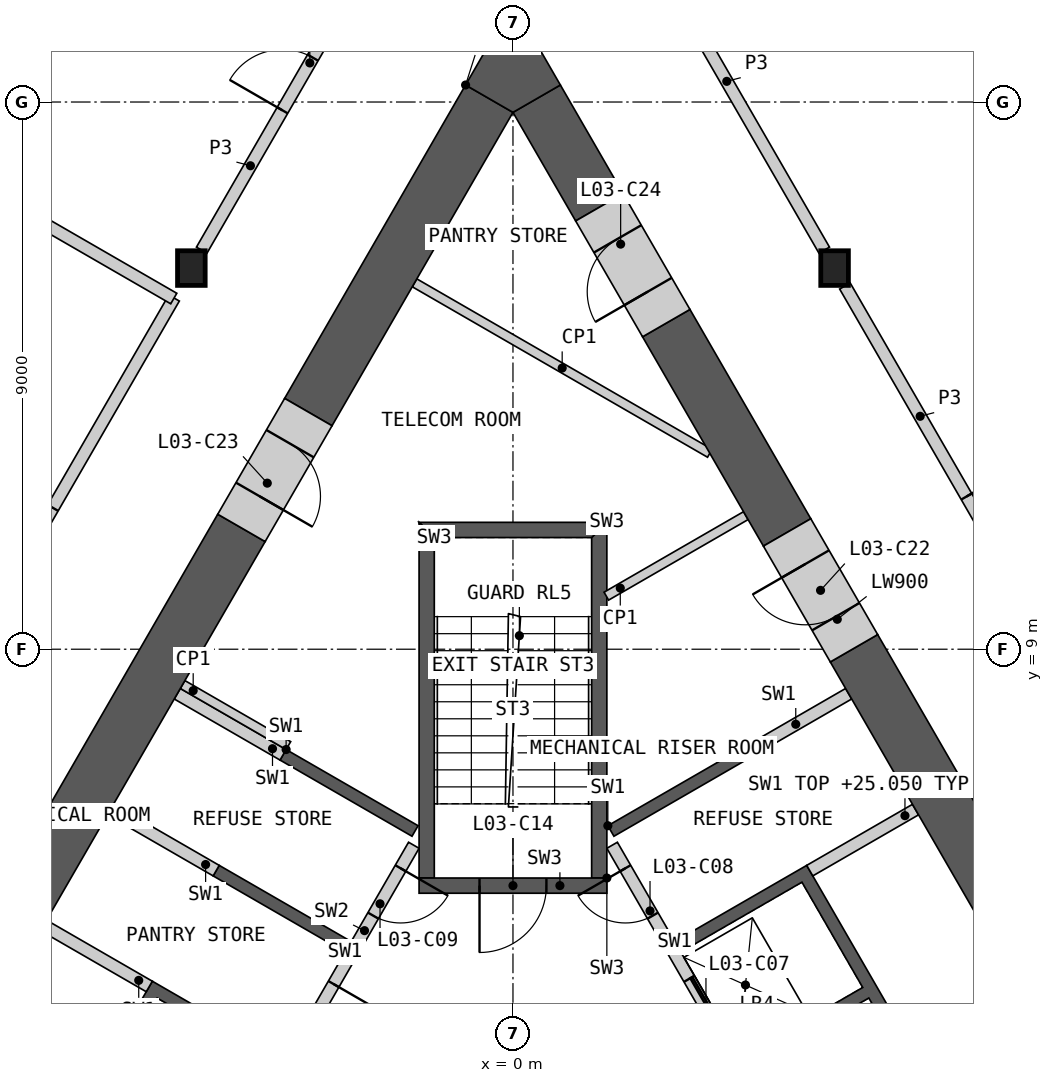
"""IFC4 building model, lengths in metres.
Left out: names, types, materials, properties, quantities, classifications, styles, units other than length and angle.
Written with IfcOpenShell. Run it as: python <this file> out.ifc"""

import sys

from ifc_helpers import new_model, si_unit, direction, frame, frame_2d, origin, origin_2d, place, context, subcontext, project, spatial, polyline, rectangle, i_section, outline, extrude, element, fill, save


model = new_model("IFC4")
c1 = context("Model", 3, precision=1e-05, world=origin(), true_north=direction((0.0, 1.0)))
c2 = subcontext(c1, "Body", "Model", "MODEL_VIEW")
j1 = project(units=[si_unit("LENGTHUNIT", "METRE"), si_unit("PLANEANGLEUNIT", "RADIAN")], contexts=[c1])
p1 = place(None, origin())
s1 = spatial("IfcSite", under=j1, at=p1, CompositionType="ELEMENT")
p2 = place(p1, origin())
s2 = spatial("IfcBuilding", under=s1, at=p2, CompositionType="ELEMENT")
p3 = place(p2, frame((0.0, 0.0, 21.0)))
s3 = spatial("IfcBuildingStorey", under=s2, at=p3, CompositionType="ELEMENT", Elevation=21.0)
for number, where, z_axis, x_axis in (
    (1, (-5.289, 15.269, 0.0), (0.0, 0.0, 1.0), (1.0, 0.0, 0.0)),
    (2, (5.289, 15.269, 0.0), (0.0, 0.0, 1.0), (1.0, 0.0, 0.0)),
):
    element("IfcColumn", number, at=place(p3, frame(where, z_axis=z_axis, x_axis=x_axis)), inside=s3, PredefinedType="COLUMN", context=c2, shape_type="SweptSolid", body=[
        extrude(i_section(OverallWidth=0.454, OverallDepth=0.57, WebThickness=0.078, FlangeThickness=0.125, at=origin_2d()), origin(), (0.0, 0.0, 1.0), 4.5),
    ])
p4 = place(p3, origin())
e3 = element("IfcWall", 3, at=p4, inside=s3, PredefinedType="SHEAR", context=c2, shape_type="SweptSolid", body=[
    extrude(outline(polyline([(1.561, 6.097), (3.731, 7.35), (3.831, 7.177), (1.66, 5.924), (1.561, 6.097)])), origin(), (0.0, 0.0, 1.0), 4.05),
])
p5 = place(p3, origin())
e4 = element("IfcWall", 4, at=p5, inside=s3, PredefinedType="SHEAR", context=c2, shape_type="SweptSolid", body=[
    extrude(outline(polyline([(2.66, 4.192), (4.831, 5.445), (8.231, -0.444), (6.061, -1.697), (5.96, -1.524), (7.952, -0.374), (6.952, 1.358), (4.96, 0.208), (4.861, 0.381), (6.852, 1.531), (5.852, 3.263), (3.861, 2.113), (3.76, 2.287), (5.752, 3.437), (4.752, 5.169), (2.76, 4.019), (2.66, 4.192)])), origin(), (0.0, 0.0, 1.0), 4.05),
])
p6 = place(p3, frame((5.817, -1.476, 0.0), z_axis=(0.0, 0.0, 1.0), x_axis=(-0.500002616675, 0.866023893041, 0.0)))
e5 = element("IfcWall", 5, at=p6, inside=s3, PredefinedType="SOLIDWALL", context=c2, shape_type="SweptSolid", body=[
    extrude(rectangle(XDim=8.373, YDim=0.2, at=frame_2d((4.187, 0.0))), origin(), (0.0, 0.0, 1.0), 4.05),
])
p7 = place(p6, frame((0.337, 0.0, 0.0)))
e6 = element("IfcOpeningElement", 6, at=p7, cuts=e5, PredefinedType="OPENING", context=c2, shape_type="SweptSolid", body=[
    extrude(rectangle(XDim=1.1, YDim=2.1, at=frame_2d((0.55, 1.05))), frame((0.0, 0.11, 0.0), z_axis=(0.0, -1.0, 0.0), x_axis=(1.0, 0.0, 0.0)), (0.0, 0.0, 1.0), 0.22),
])
p8 = place(p6, frame((2.537, 0.0, 0.0)))
e7 = element("IfcOpeningElement", 7, at=p8, cuts=e5, PredefinedType="OPENING", context=c2, shape_type="SweptSolid", body=[
    extrude(rectangle(XDim=1.1, YDim=2.1, at=frame_2d((0.55, 1.05))), frame((0.0, 0.11, 0.0), z_axis=(0.0, -1.0, 0.0), x_axis=(1.0, 0.0, 0.0)), (0.0, 0.0, 1.0), 0.22),
])
p9 = place(p6, frame((4.737, 0.0, 0.0)))
e8 = element("IfcOpeningElement", 8, at=p9, cuts=e5, PredefinedType="OPENING", context=c2, shape_type="SweptSolid", body=[
    extrude(rectangle(XDim=1.1, YDim=2.1, at=frame_2d((0.55, 1.05))), frame((0.0, 0.11, 0.0), z_axis=(0.0, -1.0, 0.0), x_axis=(1.0, 0.0, 0.0)), (0.0, 0.0, 1.0), 0.22),
])
p10 = place(p6, frame((7.037, 0.0, 0.0)))
e9 = element("IfcOpeningElement", 9, at=p10, cuts=e5, PredefinedType="OPENING", context=c2, shape_type="SweptSolid", body=[
    extrude(rectangle(XDim=0.9, YDim=2.1, at=frame_2d((0.45, 1.05))), frame((0.0, 0.11, 0.0), z_axis=(0.0, -1.0, 0.0), x_axis=(1.0, 0.0, 0.0)), (0.0, 0.0, 1.0), 0.22),
])
p11 = place(p3, frame((4.881, 5.358, 0.0), z_axis=(0.0, 0.0, 1.0), x_axis=(0.866035824272, 0.499981950752, 0.0)))
e10 = element("IfcWall", 10, at=p11, inside=s3, PredefinedType="SHEAR", context=c2, shape_type="SweptSolid", body=[
    extrude(rectangle(XDim=2.009, YDim=0.2, at=frame_2d((1.004, 0.0))), origin(), (0.0, 0.0, 1.0), 4.05),
])
p12 = place(p3, frame((3.781, 7.263, 0.0), z_axis=(0.0, 0.0, 1.0), x_axis=(0.865983199114, 0.50007309351, 0.0)))
e11 = element("IfcWall", 11, at=p12, inside=s3, PredefinedType="SHEAR", context=c2, shape_type="SweptSolid", body=[
    extrude(rectangle(XDim=2.009, YDim=0.2, at=frame_2d((1.004, 0.0))), origin(), (0.0, 0.0, 1.0), 4.05),
])
p13 = place(p3, origin())
e12 = element("IfcWall", 12, at=p13, inside=s3, PredefinedType="SHEAR", context=c2, shape_type="SweptSolid", body=[
    extrude(outline(polyline([(-4.96, 0.208), (-7.131, 1.461), (-5.931, 3.54), (-3.76, 2.287), (-3.861, 2.113), (-5.852, 3.263), (-6.852, 1.531), (-4.861, 0.381), (-4.96, 0.208)])), origin(), (0.0, 0.0, 1.0), 4.05),
])
p14 = place(p3, origin())
e13 = element("IfcWall", 13, at=p14, inside=s3, PredefinedType="SHEAR", context=c2, shape_type="SweptSolid", body=[
    extrude(outline(polyline([(-2.76, 4.019), (-4.931, 5.272), (-4.831, 5.445), (-2.66, 4.192), (-2.76, 4.019)])), origin(), (0.0, 0.0, 1.0), 4.05),
])
p15 = place(p3, origin())
e14 = element("IfcWall", 14, at=p15, inside=s3, PredefinedType="SHEAR", context=c2, shape_type="SweptSolid", body=[
    extrude(outline(polyline([(-3.731, 7.35), (-1.561, 6.097), (-1.66, 5.924), (-3.831, 7.177), (-3.731, 7.35)])), origin(), (0.0, 0.0, 1.0), 4.05),
])
p16 = place(p3, frame((-1.631, 5.776, 0.0), z_axis=(0.0, 0.0, 1.0), x_axis=(-0.499992876559, -0.866029516466, 0.0)))
e15 = element("IfcWall", 15, at=p16, inside=s3, PredefinedType="SOLIDWALL", context=c2, shape_type="SweptSolid", body=[
    extrude(rectangle(XDim=6.486, YDim=0.2, at=frame_2d((3.243, 0.0))), origin(), (0.0, 0.0, 1.0), 4.05),
])
p17 = place(p16, frame((0.437, 0.0, 0.0)))
e16 = element("IfcOpeningElement", 16, at=p17, cuts=e15, PredefinedType="OPENING", context=c2, shape_type="SweptSolid", body=[
    extrude(rectangle(XDim=0.9, YDim=2.1, at=frame_2d((0.45, 1.05))), frame((0.0, 0.11, 0.0), z_axis=(0.0, -1.0, 0.0), x_axis=(1.0, 0.0, 0.0)), (0.0, 0.0, 1.0), 0.22),
])
p18 = place(p16, frame((2.637, 0.0, 0.0)))
e17 = element("IfcOpeningElement", 17, at=p18, cuts=e15, PredefinedType="OPENING", context=c2, shape_type="SweptSolid", body=[
    extrude(rectangle(XDim=0.9, YDim=2.1, at=frame_2d((0.45, 1.05))), frame((0.0, 0.11, 0.0), z_axis=(0.0, -1.0, 0.0), x_axis=(1.0, 0.0, 0.0)), (0.0, 0.0, 1.0), 0.22),
])
p19 = place(p3, frame((-3.781, 7.263, 0.0), z_axis=(0.0, 0.0, 1.0), x_axis=(-0.865983199114, 0.50007309351, 0.0)))
e18 = element("IfcWall", 18, at=p19, inside=s3, PredefinedType="SHEAR", context=c2, shape_type="SweptSolid", body=[
    extrude(rectangle(XDim=2.009, YDim=0.2, at=frame_2d((1.004, 0.0))), origin(), (0.0, 0.0, 1.0), 4.05),
])
p20 = place(p3, frame((-4.881, 5.358, 0.0), z_axis=(0.0, 0.0, 1.0), x_axis=(-0.866035824272, 0.499981950752, 0.0)))
e19 = element("IfcWall", 19, at=p20, inside=s3, PredefinedType="SHEAR", context=c2, shape_type="SweptSolid", body=[
    extrude(rectangle(XDim=2.009, YDim=0.2, at=frame_2d((1.004, 0.0))), origin(), (0.0, 0.0, 1.0), 4.05),
])
p21 = place(p3, frame((-5.981, 3.453, 0.0), z_axis=(0.0, 0.0, 1.0), x_axis=(-0.866013584312, 0.500020471368, 0.0)))
e20 = element("IfcWall", 20, at=p21, inside=s3, PredefinedType="SHEAR", context=c2, shape_type="SweptSolid", body=[
    extrude(rectangle(XDim=2.009, YDim=0.2, at=frame_2d((1.005, 0.0))), origin(), (0.0, 0.0, 1.0), 4.05),
])
p22 = place(p3, origin())
e21 = element("IfcWall", 21, at=p22, inside=s3, PredefinedType="SHEAR", context=c2, shape_type="SweptSolid", body=[
    extrude(outline(polyline([(1.544, 5.237), (1.544, 11.087), (1.294, 10.837), (1.294, 5.237), (1.544, 5.237)])), origin(), (0.0, 0.0, 1.0), 4.05),
])
p23 = place(p3, origin())
e22 = element("IfcWall", 22, at=p23, inside=s3, PredefinedType="SHEAR", context=c2, shape_type="SweptSolid", body=[
    extrude(outline(polyline([(1.544, 11.087), (-1.544, 11.087), (-1.294, 10.837), (1.294, 10.837), (1.544, 11.087)])), origin(), (0.0, 0.0, 1.0), 4.05),
])
p24 = place(p3, origin())
e23 = element("IfcWall", 23, at=p24, inside=s3, PredefinedType="SHEAR", context=c2, shape_type="SweptSolid", body=[
    extrude(outline(polyline([(-1.294, 10.837), (-1.544, 11.087), (-1.544, 5.237), (-1.294, 5.237), (-1.294, 10.837)])), origin(), (0.0, 0.0, 1.0), 4.05),
])
p25 = place(p3, frame((1.544, 5.112, 0.0), z_axis=(0.0, 0.0, 1.0), x_axis=(-1.0, 0.0, 0.0)))
e24 = element("IfcWall", 24, at=p25, inside=s3, PredefinedType="SHEAR", context=c2, shape_type="SweptSolid", body=[
    extrude(rectangle(XDim=3.088, YDim=0.25, at=frame_2d((1.544, 0.0))), origin(), (0.0, 0.0, 1.0), 4.05),
])
p26 = place(p25, frame((0.994, 0.0, 0.0)))
e25 = element("IfcOpeningElement", 25, at=p26, cuts=e24, PredefinedType="OPENING", context=c2, shape_type="SweptSolid", body=[
    extrude(rectangle(XDim=1.1, YDim=2.1, at=frame_2d((0.55, 1.05))), frame((0.0, 0.135, 0.0), z_axis=(0.0, -1.0, 0.0), x_axis=(1.0, 0.0, 0.0)), (0.0, 0.0, 1.0), 0.27),
])
p27 = place(p3, frame((-3.693, 7.415, 0.0), z_axis=(0.0, 0.0, 1.0), x_axis=(-0.866035824272, 0.499981950752, 0.0)))
e26 = element("IfcWall", 26, at=p27, inside=s3, PredefinedType="PARTITIONING", context=c2, shape_type="SweptSolid", body=[
    extrude(rectangle(XDim=2.009, YDim=0.15, at=frame_2d((1.004, 0.0))), origin(), (0.0, 0.0, 1.0), 4.05),
])
p28 = place(p3, frame((3.829, 11.197, 0.0), z_axis=(0.0, 0.0, 1.0), x_axis=(-0.866016748302, -0.500014991436, 0.0)))
e27 = element("IfcWall", 27, at=p28, inside=s3, PredefinedType="PARTITIONING", context=c2, shape_type="SweptSolid", body=[
    extrude(rectangle(XDim=2.649, YDim=0.15, at=frame_2d((1.324, 0.0))), origin(), (0.0, 0.0, 1.0), 4.05),
])
p29 = place(p3, frame((-1.619, 15.026, 0.0), z_axis=(0.0, 0.0, 1.0), x_axis=(0.866015917575, -0.500016430238, 0.0)))
e28 = element("IfcWall", 28, at=p29, inside=s3, PredefinedType="PARTITIONING", context=c2, shape_type="SweptSolid", body=[
    extrude(rectangle(XDim=5.607, YDim=0.15, at=frame_2d((2.804, 0.0))), origin(), (0.0, 0.0, 1.0), 4.05),
])
p30 = place(p3, frame((9.561, 2.169, 0.0), z_axis=(0.0, 0.0, 1.0), x_axis=(-0.499995114243, 0.866028224559, 0.0)))
e29 = element("IfcWall", 29, at=p30, inside=s3, PredefinedType="SHEAR", context=c2, shape_type="SweptSolid", body=[
    extrude(rectangle(XDim=7.906, YDim=0.9, at=frame_2d((3.953, 0.0))), origin(), (0.0, 0.0, 1.0), 4.05),
])
p31 = place(p3, frame((4.509, 10.921, 0.0), z_axis=(0.0, 0.0, 1.0), x_axis=(-0.49999004381, 0.866031151917, 0.0)))
e30 = element("IfcWall", 30, at=p31, inside=s3, PredefinedType="SHEAR", context=c2, shape_type="SweptSolid", body=[
    extrude(rectangle(XDim=3.975, YDim=0.9, at=frame_2d((1.988, 0.0))), origin(), (0.0, 0.0, 1.0), 4.05),
])
p32 = place(p3, frame((1.421, 16.269, 0.0), z_axis=(0.0, 0.0, 1.0), x_axis=(-0.500009360108, 0.866019999656, 0.0)))
e31 = element("IfcWall", 31, at=p32, inside=s3, PredefinedType="SHEAR", context=c2, shape_type="SweptSolid", body=[
    extrude(rectangle(XDim=2.062, YDim=0.9, at=frame_2d((1.031, 0.0))), origin(), (0.0, 0.0, 1.0), 4.05),
])
p33 = place(p3, frame((-4.466, 10.995, 0.0), z_axis=(0.0, 0.0, 1.0), x_axis=(-0.500012427149, -0.866018228848, 0.0)))
e32 = element("IfcWall", 32, at=p33, inside=s3, PredefinedType="SHEAR", context=c2, shape_type="SweptSolid", body=[
    extrude(rectangle(XDim=7.409, YDim=0.9, at=frame_2d((3.705, 0.0))), origin(), (0.0, 0.0, 1.0), 4.05),
])
p34 = place(p3, frame((-0.39, 18.055, 0.0), z_axis=(0.0, 0.0, 1.0), x_axis=(-0.499981657175, -0.86603599376, 0.0)))
e33 = element("IfcWall", 33, at=p34, inside=s3, PredefinedType="SHEAR", context=c2, shape_type="SweptSolid", body=[
    extrude(rectangle(XDim=5.952, YDim=0.9, at=frame_2d((2.976, 0.0))), origin(), (0.0, 0.0, 1.0), 4.05),
])
p35 = place(p3, origin())
e34 = element("IfcWall", 34, at=p35, inside=s3, PredefinedType="SHEAR", context=c2, shape_type="SweptSolid", body=[
    extrude(outline(polyline([(-0.779, 18.28), (0.0, 19.63), (0.779, 18.28), (0.0, 17.83), (-0.779, 18.28)])), origin(), (0.0, 0.0, 1.0), 4.05),
])
p36 = place(p3, frame((5.608, 9.016, 0.0), z_axis=(0.0, 0.0, 1.0), x_axis=(-0.499994660107, 0.866028486751, 0.0)))
e35 = element("IfcWall", 35, at=p36, inside=s3, PredefinedType="SHEAR", context=c2, shape_type="SweptSolid", body=[
    extrude(rectangle(XDim=2.2, YDim=0.9, at=frame_2d((1.1, 0.0))), origin(), (0.0, 0.0, 1.0), 4.05),
])
p37 = place(p36, frame((0.6, 0.0, 0.0)))
e36 = element("IfcOpeningElement", 36, at=p37, cuts=e35, PredefinedType="OPENING", context=c2, shape_type="SweptSolid", body=[
    extrude(rectangle(XDim=1.0, YDim=2.1, at=frame_2d((0.5, 1.05))), frame((0.0, 0.46, 0.0), z_axis=(0.0, -1.0, 0.0), x_axis=(1.0, 0.0, 0.0)), (0.0, 0.0, 1.0), 0.92),
])
p38 = place(p3, frame((-3.365, 12.9, 0.0), z_axis=(0.0, 0.0, 1.0), x_axis=(-0.500077893725, -0.86598042715, 0.0)))
e37 = element("IfcWall", 37, at=p38, inside=s3, PredefinedType="SHEAR", context=c2, shape_type="SweptSolid", body=[
    extrude(rectangle(XDim=2.2, YDim=0.9, at=frame_2d((1.1, 0.0))), origin(), (0.0, 0.0, 1.0), 4.05),
])
p39 = place(p38, frame((0.6, 0.0, 0.0)))
e38 = element("IfcOpeningElement", 38, at=p39, cuts=e37, PredefinedType="OPENING", context=c2, shape_type="SweptSolid", body=[
    extrude(rectangle(XDim=1.0, YDim=2.1, at=frame_2d((0.5, 1.05))), frame((0.0, 0.46, 0.0), z_axis=(0.0, -1.0, 0.0), x_axis=(1.0, 0.0, 0.0)), (0.0, 0.0, 1.0), 0.92),
])
p40 = place(p3, frame((2.521, 14.364, 0.0), z_axis=(0.0, 0.0, 1.0), x_axis=(-0.50002983664, 0.866008176907, 0.0)))
e39 = element("IfcWall", 39, at=p40, inside=s3, PredefinedType="SHEAR", context=c2, shape_type="SweptSolid", body=[
    extrude(rectangle(XDim=2.2, YDim=0.9, at=frame_2d((1.1, 0.0))), origin(), (0.0, 0.0, 1.0), 4.05),
])
p41 = place(p40, frame((0.6, 0.0, 0.0)))
e40 = element("IfcOpeningElement", 40, at=p41, cuts=e39, PredefinedType="OPENING", context=c2, shape_type="SweptSolid", body=[
    extrude(rectangle(XDim=1.0, YDim=2.1, at=frame_2d((0.5, 1.05))), frame((0.0, 0.46, 0.0), z_axis=(0.0, -1.0, 0.0), x_axis=(1.0, 0.0, 0.0)), (0.0, 0.0, 1.0), 0.92),
])
p42 = place(p3, frame((5.459, 14.974, 0.0), z_axis=(0.0, 0.0, 1.0), x_axis=(0.499985793049, -0.866033606016, 0.0)))
e41 = element("IfcWall", 41, at=p42, inside=s3, PredefinedType="PARTITIONING", context=c2, shape_type="SweptSolid", body=[
    extrude(rectangle(XDim=9.898, YDim=0.2, at=frame_2d((4.949, 0.0))), origin(), (0.0, 0.0, 1.0), 4.05),
])
p43 = place(p42, frame((3.998, 0.0, 0.0)))
e42 = element("IfcOpeningElement", 42, at=p43, cuts=e41, PredefinedType="OPENING", context=c2, shape_type="SweptSolid", body=[
    extrude(rectangle(XDim=1.8, YDim=2.1, at=frame_2d((0.9, 1.05))), frame((0.0, 0.11, 0.0), z_axis=(0.0, -1.0, 0.0), x_axis=(1.0, 0.0, 0.0)), (0.0, 0.0, 1.0), 0.22),
])
p44 = place(p3, frame((-10.408, 6.402, 0.0), z_axis=(0.0, 0.0, 1.0), x_axis=(0.499986904098, 0.866032964575, 0.0)))
e43 = element("IfcWall", 43, at=p44, inside=s3, PredefinedType="PARTITIONING", context=c2, shape_type="SweptSolid", body=[
    extrude(rectangle(XDim=9.67, YDim=0.2, at=frame_2d((4.835, 0.0))), origin(), (0.0, 0.0, 1.0), 4.05),
])
p45 = place(p44, frame((3.884, 0.0, 0.0)))
e44 = element("IfcOpeningElement", 44, at=p45, cuts=e43, PredefinedType="OPENING", context=c2, shape_type="SweptSolid", body=[
    extrude(rectangle(XDim=1.8, YDim=2.1, at=frame_2d((0.9, 1.05))), frame((0.0, 0.11, 0.0), z_axis=(0.0, -1.0, 0.0), x_axis=(1.0, 0.0, 0.0)), (0.0, 0.0, 1.0), 0.22),
])
p46 = place(p3, frame((-5.119, 15.563, 0.0), z_axis=(0.0, 0.0, 1.0), x_axis=(0.500004801114, 0.866022631842, 0.0)))
e45 = element("IfcWall", 45, at=p46, inside=s3, PredefinedType="PARTITIONING", context=c2, shape_type="SweptSolid", body=[
    extrude(rectangle(XDim=6.412, YDim=0.2, at=frame_2d((3.206, 0.0))), origin(), (0.0, 0.0, 1.0), 4.05),
])
p47 = place(p46, frame((2.656, 0.0, 0.0)))
e46 = element("IfcOpeningElement", 46, at=p47, cuts=e45, PredefinedType="OPENING", context=c2, shape_type="SweptSolid", body=[
    extrude(rectangle(XDim=1.0, YDim=2.1, at=frame_2d((0.5, 1.05))), frame((0.0, 0.11, 0.0), z_axis=(0.0, -1.0, 0.0), x_axis=(1.0, 0.0, 0.0)), (0.0, 0.0, 1.0), 0.22),
])
p48 = place(p3, frame((1.913, 21.116, 0.0), z_axis=(0.0, 0.0, 1.0), x_axis=(0.500004801114, -0.866022631842, 0.0)))
e47 = element("IfcWall", 47, at=p48, inside=s3, PredefinedType="PARTITIONING", context=c2, shape_type="SweptSolid", body=[
    extrude(rectangle(XDim=6.412, YDim=0.2, at=frame_2d((3.206, 0.0))), origin(), (0.0, 0.0, 1.0), 4.05),
])
p49 = place(p3, frame((-14.31, 19.809, 0.0), z_axis=(0.0, 0.0, 1.0), x_axis=(0.866017018378, -0.500014523669, 0.0)))
e48 = element("IfcWall", 48, at=p49, inside=s3, PredefinedType="PARTITIONING", context=c2, shape_type="SweptSolid", body=[
    extrude(rectangle(XDim=10.082, YDim=0.2, at=frame_2d((5.041, 0.0))), origin(), (0.0, 0.0, 1.0), 4.05),
])
p50 = place(p9, origin())
e49 = element("IfcDoor", 49, at=p50, inside=s3, OperationType="SLIDING_TO_LEFT", PredefinedType="DOOR", context=c2, shape_type="SweptSolid", body=[
    extrude(rectangle(XDim=1.1, YDim=2.1, at=frame_2d((0.55, 1.05))), frame((0.0, 0.025, 0.0), z_axis=(0.0, -1.0, 0.0), x_axis=(1.0, 0.0, 0.0)), (0.0, 0.0, 1.0), 0.05),
])
fill(e8, e49)
p51 = place(p10, origin())
e50 = element("IfcDoor", 50, at=p51, inside=s3, OperationType="SINGLE_SWING_RIGHT", PredefinedType="DOOR", context=c2, shape_type="SweptSolid", body=[
    extrude(rectangle(XDim=0.9, YDim=2.1, at=frame_2d((0.45, 1.05))), frame((0.0, 0.025, 0.0), z_axis=(0.0, -1.0, 0.0), x_axis=(1.0, 0.0, 0.0)), (0.0, 0.0, 1.0), 0.05),
])
fill(e9, e50)
p52 = place(p17, origin())
e51 = element("IfcDoor", 51, at=p52, inside=s3, OperationType="SINGLE_SWING_LEFT", PredefinedType="DOOR", context=c2, shape_type="SweptSolid", body=[
    extrude(rectangle(XDim=0.9, YDim=2.1, at=frame_2d((0.45, 1.05))), frame((0.0, 0.025, 0.0), z_axis=(0.0, -1.0, 0.0), x_axis=(1.0, 0.0, 0.0)), (0.0, 0.0, 1.0), 0.05),
])
fill(e16, e51)
p53 = place(p18, origin())
e52 = element("IfcDoor", 52, at=p53, inside=s3, OperationType="SINGLE_SWING_LEFT", PredefinedType="DOOR", context=c2, shape_type="SweptSolid", body=[
    extrude(rectangle(XDim=0.9, YDim=2.1, at=frame_2d((0.45, 1.05))), frame((0.0, 0.025, 0.0), z_axis=(0.0, -1.0, 0.0), x_axis=(1.0, 0.0, 0.0)), (0.0, 0.0, 1.0), 0.05),
])
fill(e17, e52)
p54 = place(p26, origin())
e53 = element("IfcDoor", 53, at=p54, inside=s3, OperationType="SINGLE_SWING_RIGHT", PredefinedType="DOOR", context=c2, shape_type="SweptSolid", body=[
    extrude(rectangle(XDim=1.1, YDim=2.1, at=frame_2d((0.55, 1.05))), frame((0.0, 0.025, 0.0), z_axis=(0.0, -1.0, 0.0), x_axis=(1.0, 0.0, 0.0)), (0.0, 0.0, 1.0), 0.05),
])
fill(e25, e53)
p55 = place(p37, origin())
e54 = element("IfcDoor", 54, at=p55, inside=s3, OperationType="SINGLE_SWING_RIGHT", PredefinedType="DOOR", context=c2, shape_type="SweptSolid", body=[
    extrude(rectangle(XDim=1.0, YDim=2.1, at=frame_2d((0.5, 1.05))), frame((0.0, 0.205, 0.0), z_axis=(0.0, -1.0, 0.0), x_axis=(1.0, 0.0, 0.0)), (0.0, 0.0, 1.0), 0.05),
])
fill(e36, e54)
p56 = place(p39, origin())
e55 = element("IfcDoor", 55, at=p56, inside=s3, OperationType="SINGLE_SWING_RIGHT", PredefinedType="DOOR", context=c2, shape_type="SweptSolid", body=[
    extrude(rectangle(XDim=1.0, YDim=2.1, at=frame_2d((0.5, 1.05))), frame((0.0, 0.205, 0.0), z_axis=(0.0, -1.0, 0.0), x_axis=(1.0, 0.0, 0.0)), (0.0, 0.0, 1.0), 0.05),
])
fill(e38, e55)
p57 = place(p41, origin())
e56 = element("IfcDoor", 56, at=p57, inside=s3, OperationType="SINGLE_SWING_LEFT", PredefinedType="DOOR", context=c2, shape_type="SweptSolid", body=[
    extrude(rectangle(XDim=1.0, YDim=2.1, at=frame_2d((0.5, 1.05))), frame((0.0, 0.205, 0.0), z_axis=(0.0, -1.0, 0.0), x_axis=(1.0, 0.0, 0.0)), (0.0, 0.0, 1.0), 0.05),
])
fill(e40, e56)
p58 = place(p47, origin())
e57 = element("IfcDoor", 57, at=p58, inside=s3, OperationType="SINGLE_SWING_LEFT", PredefinedType="DOOR", context=c2, shape_type="SweptSolid", body=[
    extrude(rectangle(XDim=1.0, YDim=2.1, at=frame_2d((0.5, 1.05))), frame((0.0, 0.025, 0.0), z_axis=(0.0, -1.0, 0.0), x_axis=(1.0, 0.0, 0.0)), (0.0, 0.0, 1.0), 0.05),
])
fill(e46, e57)
p59 = place(p45, origin())
e58 = element("IfcDoor", 58, at=p59, inside=s3, OperationType="DOUBLE_DOOR_SINGLE_SWING", PredefinedType="DOOR", context=c2, shape_type="SweptSolid", body=[
    extrude(rectangle(XDim=1.8, YDim=2.1, at=frame_2d((0.9, 1.05))), frame((0.0, 0.025, 0.0), z_axis=(0.0, -1.0, 0.0), x_axis=(1.0, 0.0, 0.0)), (0.0, 0.0, 1.0), 0.05),
])
fill(e44, e58)
p60 = place(p43, origin())
e59 = element("IfcDoor", 59, at=p60, inside=s3, OperationType="DOUBLE_DOOR_SINGLE_SWING", PredefinedType="DOOR", context=c2, shape_type="SweptSolid", body=[
    extrude(rectangle(XDim=1.8, YDim=2.1, at=frame_2d((0.9, 1.05))), frame((0.0, 0.025, 0.0), z_axis=(0.0, -1.0, 0.0), x_axis=(1.0, 0.0, 0.0)), (0.0, 0.0, 1.0), 0.05),
])
fill(e42, e59)
save(model, sys.argv[1])
